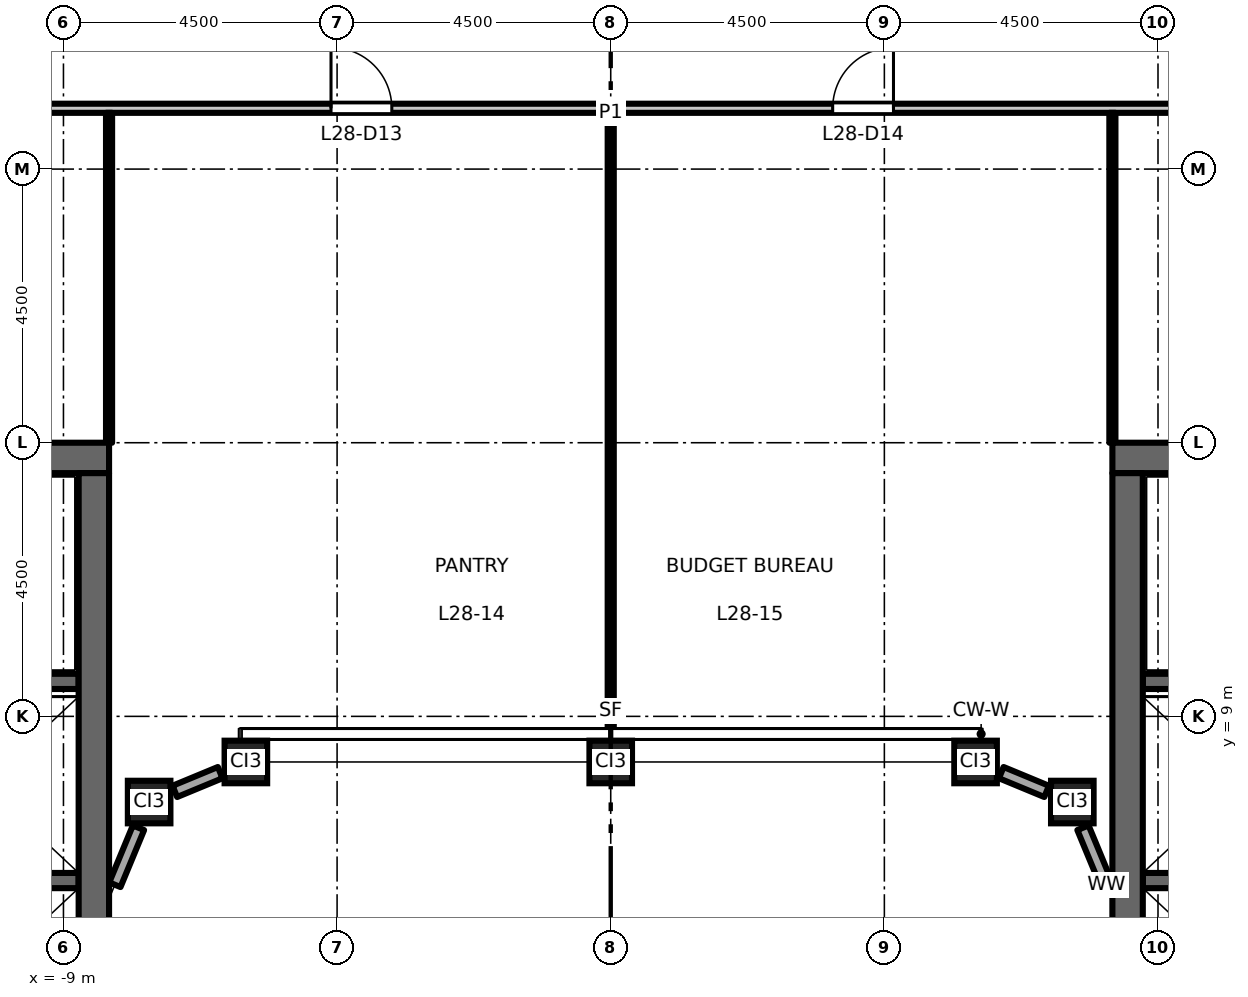
"""IFC4 building model, lengths in metres.
Left out: names, types, materials, properties, quantities, classifications, styles, units other than length and angle.
Written with IfcOpenShell. Run it as: python <this file> out.ifc"""

import sys

from ifc_helpers import new_model, si_unit, direction, frame, frame_2d, origin, origin_2d, place, context, subcontext, project, spatial, rectangle, hollow_rectangle, extrude, element, fill, save


model = new_model("IFC4")
c1 = context("Model", 3, precision=1e-05, world=origin(), true_north=direction((0.0, 1.0)))
c2 = subcontext(c1, "Body", "Model", "MODEL_VIEW")
j1 = project(units=[si_unit("LENGTHUNIT", "METRE"), si_unit("PLANEANGLEUNIT", "RADIAN")], contexts=[c1])
p1 = place(None, origin())
s1 = spatial("IfcSite", under=j1, at=p1, CompositionType="ELEMENT")
p2 = place(p1, origin())
s2 = spatial("IfcBuilding", under=s1, at=p2, CompositionType="ELEMENT")
p3 = place(p2, frame((0.0, 0.0, 131.7)))
s3 = spatial("IfcBuildingStorey", under=s2, at=p3, CompositionType="ELEMENT", Elevation=131.7)
for number, where, z_axis, x_axis in (
    (1, (-7.591, 7.591, 0.0), (0.0, 0.0, 1.0), (1.0, 0.0, 0.0)),
    (2, (-6.0, 8.25, 0.0), (0.0, 0.0, 1.0), (1.0, 0.0, 0.0)),
    (3, (0.0, 8.25, 0.0), (0.0, 0.0, 1.0), (1.0, 0.0, 0.0)),
    (4, (6.0, 8.25, 0.0), (0.0, 0.0, 1.0), (1.0, 0.0, 0.0)),
    (5, (7.591, 7.591, 0.0), (0.0, 0.0, 1.0), (1.0, 0.0, 0.0)),
):
    element("IfcColumn", number, at=place(p3, frame(where, z_axis=z_axis, x_axis=x_axis)), inside=s3, PredefinedType="COLUMN", context=c2, shape_type="SweptSolid", body=[
        extrude(hollow_rectangle(XDim=0.7, YDim=0.7, WallThickness=0.04, at=origin_2d()), origin(), (0.0, 0.0, 1.0), 4.5),
    ])
p4 = place(p3, frame((-8.75, 6.3, 0.0), z_axis=(0.0, 0.0, 1.0), x_axis=(-1.0, 0.0, 0.0)))
e6 = element("IfcWall", 6, at=p4, inside=s3, PredefinedType="SHEAR", context=c2, shape_type="SweptSolid", body=[
    extrude(rectangle(XDim=3.1, YDim=0.25, at=frame_2d((1.55, 0.0))), origin(), (0.0, 0.0, 1.0), 4.35),
])
p5 = place(p3, frame((-8.75, 9.575, 0.0), z_axis=(0.0, 0.0, 1.0), x_axis=(-1.0, 0.0, 0.0)))
e7 = element("IfcWall", 7, at=p5, inside=s3, PredefinedType="SHEAR", context=c2, shape_type="SweptSolid", body=[
    extrude(rectangle(XDim=8.0, YDim=0.25, at=frame_2d((4.0, 0.0))), origin(), (0.0, 0.0, 1.0), 4.35),
])
p6 = place(p5, frame((6.65, 0.0, 0.0)))
e8 = element("IfcOpeningElement", 8, at=p6, cuts=e7, PredefinedType="OPENING", context=c2, shape_type="SweptSolid", body=[
    extrude(rectangle(XDim=1.1, YDim=2.1, at=frame_2d((0.55, 1.05))), frame((0.0, 0.135, 0.0), z_axis=(0.0, -1.0, 0.0), x_axis=(1.0, 0.0, 0.0)), (0.0, 0.0, 1.0), 0.27),
])
p7 = place(p3, frame((-8.25, 13.25, 0.0), z_axis=(0.0, 0.0, 1.0), x_axis=(-1.0, 0.0, 0.0)))
e9 = element("IfcWall", 9, at=p7, inside=s3, PredefinedType="SHEAR", context=c2, shape_type="SweptSolid", body=[
    extrude(rectangle(XDim=13.5, YDim=0.5, at=frame_2d((6.75, 0.0))), origin(), (0.0, 0.0, 1.0), 4.35),
])
p8 = place(p3, frame((-8.5, -13.0, 0.0), z_axis=(0.0, 0.0, 1.0), x_axis=(0.0, 1.0, 0.0)))
e10 = element("IfcWall", 10, at=p8, inside=s3, PredefinedType="SHEAR", context=c2, shape_type="SweptSolid", body=[
    extrude(rectangle(XDim=26.0, YDim=0.5, at=frame_2d((13.0, 0.0))), origin(), (0.0, 0.0, 1.0), 4.35),
])
p9 = place(p3, frame((8.75, 6.3, 0.0), z_axis=(0.0, 0.0, 1.0), x_axis=(1.0, 0.0, 0.0)))
e11 = element("IfcWall", 11, at=p9, inside=s3, PredefinedType="SHEAR", context=c2, shape_type="SweptSolid", body=[
    extrude(rectangle(XDim=3.1, YDim=0.25, at=frame_2d((1.55, 0.0))), origin(), (0.0, 0.0, 1.0), 4.35),
])
p10 = place(p3, frame((8.75, 9.575, 0.0), z_axis=(0.0, 0.0, 1.0), x_axis=(1.0, 0.0, 0.0)))
e12 = element("IfcWall", 12, at=p10, inside=s3, PredefinedType="SHEAR", context=c2, shape_type="SweptSolid", body=[
    extrude(rectangle(XDim=8.0, YDim=0.25, at=frame_2d((4.0, 0.0))), origin(), (0.0, 0.0, 1.0), 4.35),
])
p11 = place(p10, frame((6.65, 0.0, 0.0)))
e13 = element("IfcOpeningElement", 13, at=p11, cuts=e12, PredefinedType="OPENING", context=c2, shape_type="SweptSolid", body=[
    extrude(rectangle(XDim=1.1, YDim=2.1, at=frame_2d((0.55, 1.05))), frame((0.0, 0.135, 0.0), z_axis=(0.0, -1.0, 0.0), x_axis=(1.0, 0.0, 0.0)), (0.0, 0.0, 1.0), 0.27),
])
p12 = place(p3, frame((8.25, 13.25, 0.0), z_axis=(0.0, 0.0, 1.0), x_axis=(1.0, 0.0, 0.0)))
e14 = element("IfcWall", 14, at=p12, inside=s3, PredefinedType="SHEAR", context=c2, shape_type="SweptSolid", body=[
    extrude(rectangle(XDim=13.5, YDim=0.5, at=frame_2d((6.75, 0.0))), origin(), (0.0, 0.0, 1.0), 4.35),
])
p13 = place(p3, frame((8.5, -13.0, 0.0), z_axis=(0.0, 0.0, 1.0), x_axis=(0.0, 1.0, 0.0)))
e15 = element("IfcWall", 15, at=p13, inside=s3, PredefinedType="SHEAR", context=c2, shape_type="SweptSolid", body=[
    extrude(rectangle(XDim=26.0, YDim=0.5, at=frame_2d((13.0, 0.0))), origin(), (0.0, 0.0, 1.0), 4.35),
])
p14 = place(p3, frame((8.154, 6.231, 0.0), z_axis=(0.0, 0.0, 1.0), x_axis=(-0.382769662028, 0.923843810301, 0.0)))
e16 = element("IfcWall", 16, at=p14, inside=s3, PredefinedType="STANDARD", context=c2, shape_type="SweptSolid", body=[
    extrude(rectangle(XDim=1.015, YDim=0.2, at=frame_2d((0.507, 0.0))), origin(), (0.0, 0.0, 1.0), 3.826),
])
for number, where, z_axis, x_axis in (
    (17, (7.168, 7.766, 0.0), (0.0, 0.0, 1.0), (-0.924, 0.383, 0.0)),
    (18, (-6.423, 8.075, 0.0), (0.0, 0.0, 1.0), (-0.924, -0.383, 0.0)),
):
    element("IfcWall", number, at=place(p3, frame(where, z_axis=z_axis, x_axis=x_axis)), inside=s3, PredefinedType="STANDARD", context=c2, shape_type="SweptSolid", body=[
        extrude(rectangle(XDim=0.807, YDim=0.2, at=frame_2d((0.404, 0.0))), origin(), (0.0, 0.0, 1.0), 3.826),
    ])
p15 = place(p3, frame((-7.766, 7.168, 0.0), z_axis=(0.0, 0.0, 1.0), x_axis=(-0.382769662028, -0.923843810301, 0.0)))
e19 = element("IfcWall", 19, at=p15, inside=s3, PredefinedType="STANDARD", context=c2, shape_type="SweptSolid", body=[
    extrude(rectangle(XDim=1.015, YDim=0.2, at=frame_2d((0.507, 0.0))), origin(), (0.0, 0.0, 1.0), 3.826),
])
p16 = place(p3, frame((-21.825, 19.0, 0.0), z_axis=(0.0, 0.0, 1.0), x_axis=(1.0, 0.0, 0.0)))
e20 = element("IfcWall", 20, at=p16, inside=s3, PredefinedType="PARTITIONING", context=c2, shape_type="SweptSolid", body=[
    extrude(rectangle(XDim=43.65, YDim=0.15, at=frame_2d((21.825, 0.0))), origin(), (0.0, 0.0, 1.0), 4.35),
])
p17 = place(p16, frame((17.225, 0.0, 0.0)))
e21 = element("IfcOpeningElement", 21, at=p17, cuts=e20, PredefinedType="OPENING", context=c2, shape_type="SweptSolid", body=[
    extrude(rectangle(XDim=1.0, YDim=2.1, at=frame_2d((0.5, 1.05))), frame((0.0, 0.085, 0.0), z_axis=(0.0, -1.0, 0.0), x_axis=(1.0, 0.0, 0.0)), (0.0, 0.0, 1.0), 0.17),
])
p18 = place(p16, frame((25.475, 0.0, 0.0)))
e22 = element("IfcOpeningElement", 22, at=p18, cuts=e20, PredefinedType="OPENING", context=c2, shape_type="SweptSolid", body=[
    extrude(rectangle(XDim=1.0, YDim=2.1, at=frame_2d((0.5, 1.05))), frame((0.0, 0.085, 0.0), z_axis=(0.0, -1.0, 0.0), x_axis=(1.0, 0.0, 0.0)), (0.0, 0.0, 1.0), 0.17),
])
p19 = place(p16, frame((6.225, 0.0, 0.0)))
e23 = element("IfcOpeningElement", 23, at=p19, cuts=e20, PredefinedType="OPENING", context=c2, shape_type="SweptSolid", body=[
    extrude(rectangle(XDim=1.0, YDim=2.1, at=frame_2d((0.5, 1.05))), frame((0.0, 0.085, 0.0), z_axis=(0.0, -1.0, 0.0), x_axis=(1.0, 0.0, 0.0)), (0.0, 0.0, 1.0), 0.17),
])
p20 = place(p16, frame((36.225, 0.0, 0.0)))
e24 = element("IfcOpeningElement", 24, at=p20, cuts=e20, PredefinedType="OPENING", context=c2, shape_type="SweptSolid", body=[
    extrude(rectangle(XDim=1.0, YDim=2.1, at=frame_2d((0.5, 1.05))), frame((0.0, 0.085, 0.0), z_axis=(0.0, -1.0, 0.0), x_axis=(1.0, 0.0, 0.0)), (0.0, 0.0, 1.0), 0.17),
])
p21 = place(p3, frame((-8.25, 13.5, 0.0), z_axis=(0.0, 0.0, 1.0), x_axis=(0.0, 1.0, 0.0)))
e25 = element("IfcWall", 25, at=p21, inside=s3, PredefinedType="PARTITIONING", context=c2, shape_type="SweptSolid", body=[
    extrude(rectangle(XDim=5.425, YDim=0.1, at=frame_2d((2.712, 0.0))), origin(), (0.0, 0.0, 1.0), 4.35),
])
p22 = place(p3, frame((0.0, 8.65, 0.0), z_axis=(0.0, 0.0, 1.0), x_axis=(0.0, 1.0, 0.0)))
e26 = element("IfcWall", 26, at=p22, inside=s3, PredefinedType="PARTITIONING", context=c2, shape_type="SweptSolid", body=[
    extrude(rectangle(XDim=10.275, YDim=0.1, at=frame_2d((5.138, 0.0))), origin(), (0.0, 0.0, 1.0), 3.45),
])
p23 = place(p3, frame((8.25, 13.5, 0.0), z_axis=(0.0, 0.0, 1.0), x_axis=(0.0, 1.0, 0.0)))
e27 = element("IfcWall", 27, at=p23, inside=s3, PredefinedType="PARTITIONING", context=c2, shape_type="SweptSolid", body=[
    extrude(rectangle(XDim=5.425, YDim=0.1, at=frame_2d((2.712, 0.0))), origin(), (0.0, 0.0, 1.0), 4.35),
])
p24 = place(p17, origin())
e28 = element("IfcDoor", 28, at=p24, inside=s3, OperationType="SINGLE_SWING_LEFT", PredefinedType="DOOR", context=c2, shape_type="SweptSolid", body=[
    extrude(rectangle(XDim=1.0, YDim=2.1, at=frame_2d((0.5, 1.05))), frame((0.0, 0.025, 0.0), z_axis=(0.0, -1.0, 0.0), x_axis=(1.0, 0.0, 0.0)), (0.0, 0.0, 1.0), 0.05),
])
fill(e21, e28)
p25 = place(p18, origin())
e29 = element("IfcDoor", 29, at=p25, inside=s3, OperationType="SINGLE_SWING_RIGHT", PredefinedType="DOOR", context=c2, shape_type="SweptSolid", body=[
    extrude(rectangle(XDim=1.0, YDim=2.1, at=frame_2d((0.5, 1.05))), frame((0.0, 0.025, 0.0), z_axis=(0.0, -1.0, 0.0), x_axis=(1.0, 0.0, 0.0)), (0.0, 0.0, 1.0), 0.05),
])
fill(e22, e29)
save(model, sys.argv[1])
